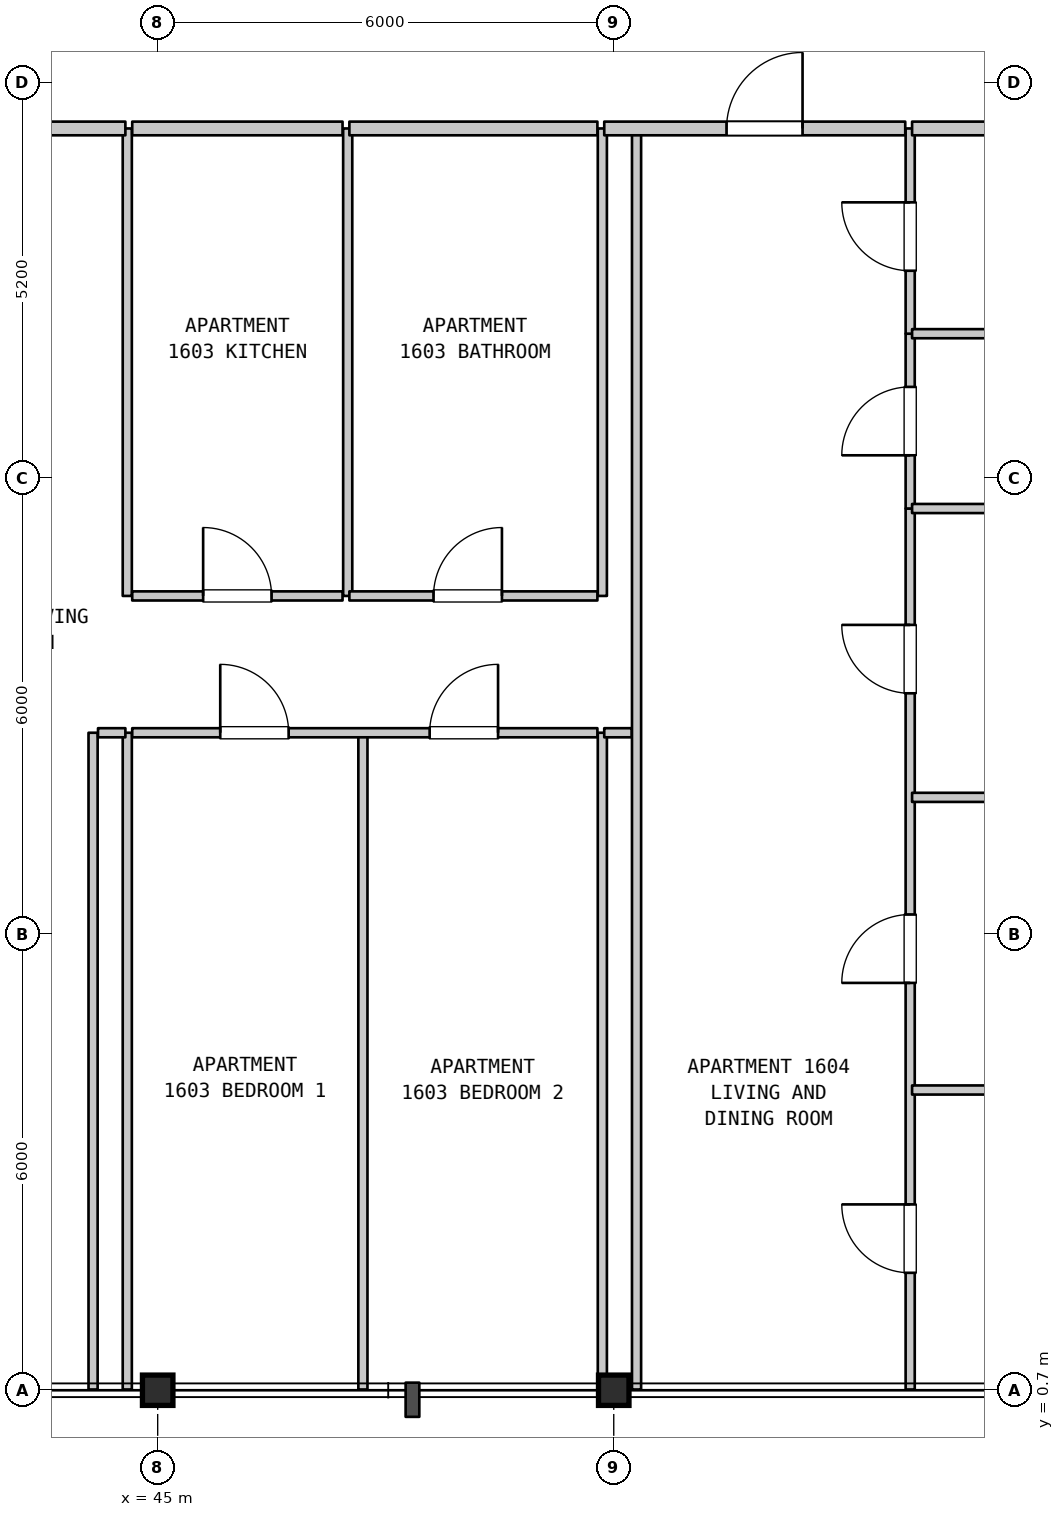
"""IFC4 building model, lengths in metres.
Left out: names, types, materials, properties, quantities, classifications, styles, units other than length and angle.
Written with IfcOpenShell. Run it as: python <this file> out.ifc"""

import sys

from ifc_helpers import new_model, si_unit, direction, frame, frame_2d, origin, origin_2d, place, context, subcontext, project, spatial, rectangle, i_section, extrude, element, fill, save


model = new_model("IFC4")
c1 = context("Model", 3, precision=1e-05, world=origin(), true_north=direction((0.0, 1.0)))
c2 = subcontext(c1, "Body", "Model", "MODEL_VIEW")
j1 = project(units=[si_unit("LENGTHUNIT", "METRE"), si_unit("PLANEANGLEUNIT", "RADIAN")], contexts=[c1])
p1 = place(None, origin())
s1 = spatial("IfcSite", under=j1, at=p1, CompositionType="ELEMENT")
p2 = place(p1, origin())
s2 = spatial("IfcBuilding", under=s1, at=p2, CompositionType="ELEMENT")
p3 = place(p2, frame((0.0, 0.0, 70.1)))
s3 = spatial("IfcBuildingStorey", under=s2, at=p3, CompositionType="ELEMENT", Elevation=70.1)
for number, where, z_axis, x_axis in (
    (1, (45.0, 0.7, 0.0), (0.0, 0.0, 1.0), (1.0, 0.0, 0.0)),
    (2, (51.0, 0.7, 0.0), (0.0, 0.0, 1.0), (1.0, 0.0, 0.0)),
):
    element("IfcColumn", number, at=place(p3, frame(where, z_axis=z_axis, x_axis=x_axis)), inside=s3, PredefinedType="COLUMN", context=c2, shape_type="SweptSolid", body=[
        extrude(i_section(OverallWidth=0.401, OverallDepth=0.399, WebThickness=0.025, FlangeThickness=0.04, FilletRadius=0.015, at=origin_2d()), origin(), (0.0, 0.0, 1.0), 3.7),
    ])
for number, where, z_axis, x_axis in (
    (3, (44.15, 0.71, 0.0), (0.0, 0.0, 1.0), (0.0, 1.0, 0.0)),
    (4, (44.6, 0.71, 0.0), (0.0, 0.0, 1.0), (0.0, 1.0, 0.0)),
):
    element("IfcWall", number, at=place(p3, frame(where, z_axis=z_axis, x_axis=x_axis)), inside=s3, PredefinedType="PARTITIONING", context=c2, shape_type="SweptSolid", body=[
        extrude(rectangle(XDim=8.64, YDim=0.12, at=frame_2d((4.32, 0.0))), origin(), (0.0, 0.0, 1.0), 3.385),
    ])
for number, where, z_axis, x_axis in (
    (5, (44.6, 11.15, 0.0), (0.0, 0.0, 1.0), (0.0, 1.0, 0.0)),
    (6, (47.5, 11.15, 0.0), (0.0, 0.0, 1.0), (0.0, 1.0, 0.0)),
):
    element("IfcWall", number, at=place(p3, frame(where, z_axis=z_axis, x_axis=x_axis)), inside=s3, PredefinedType="PARTITIONING", context=c2, shape_type="SweptSolid", body=[
        extrude(rectangle(XDim=6.15, YDim=0.12, at=frame_2d((3.075, 0.0))), origin(), (0.0, 0.0, 1.0), 3.385),
    ])
for number, where, z_axis, x_axis in (
    (7, (47.7, 0.71, 0.0), (0.0, 0.0, 1.0), (0.0, 1.0, 0.0)),
    (8, (50.85, 0.71, 0.0), (0.0, 0.0, 1.0), (0.0, 1.0, 0.0)),
):
    element("IfcWall", number, at=place(p3, frame(where, z_axis=z_axis, x_axis=x_axis)), inside=s3, PredefinedType="PARTITIONING", context=c2, shape_type="SweptSolid", body=[
        extrude(rectangle(XDim=8.64, YDim=0.12, at=frame_2d((4.32, 0.0))), origin(), (0.0, 0.0, 1.0), 3.385),
    ])
p4 = place(p3, frame((50.85, 11.15, 0.0), z_axis=(0.0, 0.0, 1.0), x_axis=(0.0, 1.0, 0.0)))
e9 = element("IfcWall", 9, at=p4, inside=s3, PredefinedType="PARTITIONING", context=c2, shape_type="SweptSolid", body=[
    extrude(rectangle(XDim=6.15, YDim=0.12, at=frame_2d((3.075, 0.0))), origin(), (0.0, 0.0, 1.0), 3.385),
])
p5 = place(p3, frame((51.3, 0.71, 0.0), z_axis=(0.0, 0.0, 1.0), x_axis=(0.0, 1.0, 0.0)))
e10 = element("IfcWall", 10, at=p5, inside=s3, PredefinedType="PARTITIONING", context=c2, shape_type="SweptSolid", body=[
    extrude(rectangle(XDim=16.59, YDim=0.12, at=frame_2d((8.295, 0.0))), origin(), (0.0, 0.0, 1.0), 3.385),
])
p6 = place(p3, frame((54.9, 0.71, 0.0), z_axis=(0.0, 0.0, 1.0), x_axis=(0.0, 1.0, 0.0)))
e11 = element("IfcWall", 11, at=p6, inside=s3, PredefinedType="PARTITIONING", context=c2, shape_type="SweptSolid", body=[
    extrude(rectangle(XDim=11.59, YDim=0.12, at=frame_2d((5.795, 0.0))), origin(), (0.0, 0.0, 1.0), 3.385),
])
p7 = place(p6, frame((1.535, 0.0, 0.0)))
e12 = element("IfcOpeningElement", 12, at=p7, cuts=e11, PredefinedType="OPENING", context=c2, shape_type="SweptSolid", body=[
    extrude(rectangle(XDim=0.9, YDim=2.15, at=frame_2d((0.45, 1.075))), frame((0.0, 0.07, 0.0), z_axis=(0.0, -1.0, 0.0), x_axis=(1.0, 0.0, 0.0)), (0.0, 0.0, 1.0), 0.14),
])
p8 = place(p6, frame((5.349, 0.0, 0.0)))
e13 = element("IfcOpeningElement", 13, at=p8, cuts=e11, PredefinedType="OPENING", context=c2, shape_type="SweptSolid", body=[
    extrude(rectangle(XDim=0.9, YDim=2.15, at=frame_2d((0.45, 1.075))), frame((0.0, 0.07, 0.0), z_axis=(0.0, -1.0, 0.0), x_axis=(1.0, 0.0, 0.0)), (0.0, 0.0, 1.0), 0.14),
])
p9 = place(p6, frame((9.159, 0.0, 0.0)))
e14 = element("IfcOpeningElement", 14, at=p9, cuts=e11, PredefinedType="OPENING", context=c2, shape_type="SweptSolid", body=[
    extrude(rectangle(XDim=0.9, YDim=2.15, at=frame_2d((0.45, 1.075))), frame((0.0, 0.07, 0.0), z_axis=(0.0, -1.0, 0.0), x_axis=(1.0, 0.0, 0.0)), (0.0, 0.0, 1.0), 0.14),
])
p10 = place(p3, frame((54.9, 12.3, 0.0), z_axis=(0.0, 0.0, 1.0), x_axis=(0.0, 1.0, 0.0)))
e15 = element("IfcWall", 15, at=p10, inside=s3, PredefinedType="PARTITIONING", context=c2, shape_type="SweptSolid", body=[
    extrude(rectangle(XDim=2.3, YDim=0.12, at=frame_2d((1.15, 0.0))), origin(), (0.0, 0.0, 1.0), 3.385),
])
p11 = place(p10, frame((0.7, 0.0, 0.0)))
e16 = element("IfcOpeningElement", 16, at=p11, cuts=e15, PredefinedType="OPENING", context=c2, shape_type="SweptSolid", body=[
    extrude(rectangle(XDim=0.9, YDim=2.15, at=frame_2d((0.45, 1.075))), frame((0.0, 0.07, 0.0), z_axis=(0.0, -1.0, 0.0), x_axis=(1.0, 0.0, 0.0)), (0.0, 0.0, 1.0), 0.14),
])
p12 = place(p3, frame((54.9, 14.6, 0.0), z_axis=(0.0, 0.0, 1.0), x_axis=(0.0, 1.0, 0.0)))
e17 = element("IfcWall", 17, at=p12, inside=s3, PredefinedType="PARTITIONING", context=c2, shape_type="SweptSolid", body=[
    extrude(rectangle(XDim=2.7, YDim=0.12, at=frame_2d((1.35, 0.0))), origin(), (0.0, 0.0, 1.0), 3.385),
])
p13 = place(p12, frame((0.828, 0.0, 0.0)))
e18 = element("IfcOpeningElement", 18, at=p13, cuts=e17, PredefinedType="OPENING", context=c2, shape_type="SweptSolid", body=[
    extrude(rectangle(XDim=0.9, YDim=2.1, at=frame_2d((0.45, 1.05))), frame((0.0, 0.07, 0.0), z_axis=(0.0, -1.0, 0.0), x_axis=(1.0, 0.0, 0.0)), (0.0, 0.0, 1.0), 0.14),
])
for number, where, z_axis, x_axis in (
    (19, (54.925, 4.65, 0.0), (0.0, 0.0, 1.0), (1.0, 0.0, 0.0)),
    (20, (54.925, 8.5, 0.0), (0.0, 0.0, 1.0), (1.0, 0.0, 0.0)),
):
    element("IfcWall", number, at=place(p3, frame(where, z_axis=z_axis, x_axis=x_axis)), inside=s3, PredefinedType="PARTITIONING", context=c2, shape_type="SweptSolid", body=[
        extrude(rectangle(XDim=5.64, YDim=0.12, at=frame_2d((2.82, 0.0))), origin(), (0.0, 0.0, 1.0), 3.385),
    ])
p14 = place(p3, frame((44.215, 9.35, 0.0), z_axis=(0.0, 0.0, 1.0), x_axis=(1.0, 0.0, 0.0)))
e21 = element("IfcWall", 21, at=p14, inside=s3, PredefinedType="PARTITIONING", context=c2, shape_type="SweptSolid", body=[
    extrude(rectangle(XDim=0.36, YDim=0.12, at=frame_2d((0.18, 0.0))), origin(), (0.0, 0.0, 1.0), 3.385),
])
p15 = place(p3, frame((44.665, 9.35, 0.0), z_axis=(0.0, 0.0, 1.0), x_axis=(1.0, 0.0, 0.0)))
e22 = element("IfcWall", 22, at=p15, inside=s3, PredefinedType="PARTITIONING", context=c2, shape_type="SweptSolid", body=[
    extrude(rectangle(XDim=6.12, YDim=0.12, at=frame_2d((3.06, 0.0))), origin(), (0.0, 0.0, 1.0), 3.385),
])
p16 = place(p15, frame((1.158, 0.0, 0.0)))
e23 = element("IfcOpeningElement", 23, at=p16, cuts=e22, PredefinedType="OPENING", context=c2, shape_type="SweptSolid", body=[
    extrude(rectangle(XDim=0.9, YDim=2.15, at=frame_2d((0.45, 1.075))), frame((0.0, 0.07, 0.0), z_axis=(0.0, -1.0, 0.0), x_axis=(1.0, 0.0, 0.0)), (0.0, 0.0, 1.0), 0.14),
])
p17 = place(p15, frame((3.913, 0.0, 0.0)))
e24 = element("IfcOpeningElement", 24, at=p17, cuts=e22, PredefinedType="OPENING", context=c2, shape_type="SweptSolid", body=[
    extrude(rectangle(XDim=0.9, YDim=2.15, at=frame_2d((0.45, 1.075))), frame((0.0, 0.07, 0.0), z_axis=(0.0, -1.0, 0.0), x_axis=(1.0, 0.0, 0.0)), (0.0, 0.0, 1.0), 0.14),
])
p18 = place(p3, frame((50.875, 9.35, 0.0), z_axis=(0.0, 0.0, 1.0), x_axis=(1.0, 0.0, 0.0)))
e25 = element("IfcWall", 25, at=p18, inside=s3, PredefinedType="PARTITIONING", context=c2, shape_type="SweptSolid", body=[
    extrude(rectangle(XDim=0.36, YDim=0.12, at=frame_2d((0.18, 0.0))), origin(), (0.0, 0.0, 1.0), 3.385),
])
p19 = place(p3, frame((44.665, 11.15, 0.0), z_axis=(0.0, 0.0, 1.0), x_axis=(1.0, 0.0, 0.0)))
e26 = element("IfcWall", 26, at=p19, inside=s3, PredefinedType="PARTITIONING", context=c2, shape_type="SweptSolid", body=[
    extrude(rectangle(XDim=2.767, YDim=0.12, at=frame_2d((1.383, 0.0))), origin(), (0.0, 0.0, 1.0), 3.385),
])
p20 = place(p19, frame((0.933, 0.0, 0.0)))
e27 = element("IfcOpeningElement", 27, at=p20, cuts=e26, PredefinedType="OPENING", context=c2, shape_type="SweptSolid", body=[
    extrude(rectangle(XDim=0.9, YDim=2.15, at=frame_2d((0.45, 1.075))), frame((0.0, 0.07, 0.0), z_axis=(0.0, -1.0, 0.0), x_axis=(1.0, 0.0, 0.0)), (0.0, 0.0, 1.0), 0.14),
])
p21 = place(p3, frame((47.522, 11.15, 0.0), z_axis=(0.0, 0.0, 1.0), x_axis=(1.0, 0.0, 0.0)))
e28 = element("IfcWall", 28, at=p21, inside=s3, PredefinedType="PARTITIONING", context=c2, shape_type="SweptSolid", body=[
    extrude(rectangle(XDim=3.263, YDim=0.12, at=frame_2d((1.631, 0.0))), origin(), (0.0, 0.0, 1.0), 3.385),
])
p22 = place(p21, frame((1.107, 0.0, 0.0)))
e29 = element("IfcOpeningElement", 29, at=p22, cuts=e28, PredefinedType="OPENING", context=c2, shape_type="SweptSolid", body=[
    extrude(rectangle(XDim=0.9, YDim=2.1, at=frame_2d((0.45, 1.05))), frame((0.0, 0.07, 0.0), z_axis=(0.0, -1.0, 0.0), x_axis=(1.0, 0.0, 0.0)), (0.0, 0.0, 1.0), 0.14),
])
for number, where, z_axis, x_axis in (
    (30, (54.925, 12.3, 0.0), (0.0, 0.0, 1.0), (1.0, 0.0, 0.0)),
    (31, (54.925, 14.6, 0.0), (0.0, 0.0, 1.0), (1.0, 0.0, 0.0)),
):
    element("IfcWall", number, at=place(p3, frame(where, z_axis=z_axis, x_axis=x_axis)), inside=s3, PredefinedType="PARTITIONING", context=c2, shape_type="SweptSolid", body=[
        extrude(rectangle(XDim=5.64, YDim=0.12, at=frame_2d((2.82, 0.0))), origin(), (0.0, 0.0, 1.0), 3.385),
    ])
p23 = place(p3, frame((39.935, 17.3, 0.0), z_axis=(0.0, 0.0, 1.0), x_axis=(1.0, 0.0, 0.0)))
e32 = element("IfcWall", 32, at=p23, inside=s3, PredefinedType="STANDARD", context=c2, shape_type="SweptSolid", body=[
    extrude(rectangle(XDim=4.64, YDim=0.18, at=frame_2d((2.32, 0.0))), origin(), (0.0, 0.0, 1.0), 3.385),
])
p24 = place(p23, frame((2.02, 0.0, 0.0)))
e33 = element("IfcOpeningElement", 33, at=p24, cuts=e32, PredefinedType="OPENING", context=c2, shape_type="SweptSolid", body=[
    extrude(rectangle(XDim=1.0, YDim=2.15, at=frame_2d((0.5, 1.075))), frame((0.0, 0.1, 0.0), z_axis=(0.0, -1.0, 0.0), x_axis=(1.0, 0.0, 0.0)), (0.0, 0.0, 1.0), 0.2),
])
p25 = place(p3, frame((44.665, 17.3, 0.0), z_axis=(0.0, 0.0, 1.0), x_axis=(1.0, 0.0, 0.0)))
e34 = element("IfcWall", 34, at=p25, inside=s3, PredefinedType="STANDARD", context=c2, shape_type="SweptSolid", body=[
    extrude(rectangle(XDim=2.767, YDim=0.18, at=frame_2d((1.383, 0.0))), origin(), (0.0, 0.0, 1.0), 3.385),
])
p26 = place(p3, frame((47.522, 17.3, 0.0), z_axis=(0.0, 0.0, 1.0), x_axis=(1.0, 0.0, 0.0)))
e35 = element("IfcWall", 35, at=p26, inside=s3, PredefinedType="STANDARD", context=c2, shape_type="SweptSolid", body=[
    extrude(rectangle(XDim=3.263, YDim=0.18, at=frame_2d((1.631, 0.0))), origin(), (0.0, 0.0, 1.0), 3.385),
])
p27 = place(p3, frame((50.875, 17.3, 0.0), z_axis=(0.0, 0.0, 1.0), x_axis=(1.0, 0.0, 0.0)))
e36 = element("IfcWall", 36, at=p27, inside=s3, PredefinedType="STANDARD", context=c2, shape_type="SweptSolid", body=[
    extrude(rectangle(XDim=3.96, YDim=0.18, at=frame_2d((1.98, 0.0))), origin(), (0.0, 0.0, 1.0), 3.385),
])
p28 = place(p27, frame((1.609, 0.0, 0.0)))
e37 = element("IfcOpeningElement", 37, at=p28, cuts=e36, PredefinedType="OPENING", context=c2, shape_type="SweptSolid", body=[
    extrude(rectangle(XDim=1.0, YDim=2.15, at=frame_2d((0.5, 1.075))), frame((0.0, 0.1, 0.0), z_axis=(0.0, -1.0, 0.0), x_axis=(1.0, 0.0, 0.0)), (0.0, 0.0, 1.0), 0.2),
])
p29 = place(p3, frame((54.925, 17.3, 0.0), z_axis=(0.0, 0.0, 1.0), x_axis=(1.0, 0.0, 0.0)))
e38 = element("IfcWall", 38, at=p29, inside=s3, PredefinedType="STANDARD", context=c2, shape_type="SweptSolid", body=[
    extrude(rectangle(XDim=5.64, YDim=0.18, at=frame_2d((2.82, 0.0))), origin(), (0.0, 0.0, 1.0), 3.385),
])
p30 = place(p7, origin())
e39 = element("IfcDoor", 39, at=p30, inside=s3, OperationType="SINGLE_SWING_RIGHT", PredefinedType="DOOR", context=c2, shape_type="SweptSolid", body=[
    extrude(rectangle(XDim=0.9, YDim=2.15, at=frame_2d((0.45, 1.075))), frame((0.0, 0.025, 0.0), z_axis=(0.0, -1.0, 0.0), x_axis=(1.0, 0.0, 0.0)), (0.0, 0.0, 1.0), 0.05),
])
fill(e12, e39)
p31 = place(p8, origin())
e40 = element("IfcDoor", 40, at=p31, inside=s3, OperationType="SINGLE_SWING_LEFT", PredefinedType="DOOR", context=c2, shape_type="SweptSolid", body=[
    extrude(rectangle(XDim=0.9, YDim=2.15, at=frame_2d((0.45, 1.075))), frame((0.0, 0.025, 0.0), z_axis=(0.0, -1.0, 0.0), x_axis=(1.0, 0.0, 0.0)), (0.0, 0.0, 1.0), 0.05),
])
fill(e13, e40)
p32 = place(p9, origin())
e41 = element("IfcDoor", 41, at=p32, inside=s3, OperationType="SINGLE_SWING_RIGHT", PredefinedType="DOOR", context=c2, shape_type="SweptSolid", body=[
    extrude(rectangle(XDim=0.9, YDim=2.15, at=frame_2d((0.45, 1.075))), frame((0.0, 0.025, 0.0), z_axis=(0.0, -1.0, 0.0), x_axis=(1.0, 0.0, 0.0)), (0.0, 0.0, 1.0), 0.05),
])
fill(e14, e41)
p33 = place(p11, origin())
e42 = element("IfcDoor", 42, at=p33, inside=s3, OperationType="SINGLE_SWING_LEFT", PredefinedType="DOOR", context=c2, shape_type="SweptSolid", body=[
    extrude(rectangle(XDim=0.9, YDim=2.15, at=frame_2d((0.45, 1.075))), frame((0.0, 0.025, 0.0), z_axis=(0.0, -1.0, 0.0), x_axis=(1.0, 0.0, 0.0)), (0.0, 0.0, 1.0), 0.05),
])
fill(e16, e42)
p34 = place(p13, origin())
e43 = element("IfcDoor", 43, at=p34, inside=s3, OperationType="SINGLE_SWING_RIGHT", PredefinedType="DOOR", context=c2, shape_type="SweptSolid", body=[
    extrude(rectangle(XDim=0.9, YDim=2.1, at=frame_2d((0.45, 1.05))), frame((0.0, 0.025, 0.0), z_axis=(0.0, -1.0, 0.0), x_axis=(1.0, 0.0, 0.0)), (0.0, 0.0, 1.0), 0.05),
])
fill(e18, e43)
p35 = place(p16, origin())
e44 = element("IfcDoor", 44, at=p35, inside=s3, OperationType="SINGLE_SWING_LEFT", PredefinedType="DOOR", context=c2, shape_type="SweptSolid", body=[
    extrude(rectangle(XDim=0.9, YDim=2.15, at=frame_2d((0.45, 1.075))), frame((0.0, 0.025, 0.0), z_axis=(0.0, -1.0, 0.0), x_axis=(1.0, 0.0, 0.0)), (0.0, 0.0, 1.0), 0.05),
])
fill(e23, e44)
p36 = place(p17, origin())
e45 = element("IfcDoor", 45, at=p36, inside=s3, OperationType="SINGLE_SWING_RIGHT", PredefinedType="DOOR", context=c2, shape_type="SweptSolid", body=[
    extrude(rectangle(XDim=0.9, YDim=2.15, at=frame_2d((0.45, 1.075))), frame((0.0, 0.025, 0.0), z_axis=(0.0, -1.0, 0.0), x_axis=(1.0, 0.0, 0.0)), (0.0, 0.0, 1.0), 0.05),
])
fill(e24, e45)
p37 = place(p20, origin())
e46 = element("IfcDoor", 46, at=p37, inside=s3, OperationType="SINGLE_SWING_LEFT", PredefinedType="DOOR", context=c2, shape_type="SweptSolid", body=[
    extrude(rectangle(XDim=0.9, YDim=2.15, at=frame_2d((0.45, 1.075))), frame((0.0, 0.025, 0.0), z_axis=(0.0, -1.0, 0.0), x_axis=(1.0, 0.0, 0.0)), (0.0, 0.0, 1.0), 0.05),
])
fill(e27, e46)
p38 = place(p22, origin())
e47 = element("IfcDoor", 47, at=p38, inside=s3, OperationType="SINGLE_SWING_RIGHT", PredefinedType="DOOR", context=c2, shape_type="SweptSolid", body=[
    extrude(rectangle(XDim=0.9, YDim=2.1, at=frame_2d((0.45, 1.05))), frame((0.0, 0.025, 0.0), z_axis=(0.0, -1.0, 0.0), x_axis=(1.0, 0.0, 0.0)), (0.0, 0.0, 1.0), 0.05),
])
fill(e29, e47)
p39 = place(p28, origin())
e48 = element("IfcDoor", 48, at=p39, inside=s3, OperationType="SINGLE_SWING_RIGHT", PredefinedType="DOOR", context=c2, shape_type="SweptSolid", body=[
    extrude(rectangle(XDim=1.0, YDim=2.15, at=frame_2d((0.5, 1.075))), frame((0.0, 0.025, 0.0), z_axis=(0.0, -1.0, 0.0), x_axis=(1.0, 0.0, 0.0)), (0.0, 0.0, 1.0), 0.05),
])
fill(e37, e48)
save(model, sys.argv[1])
